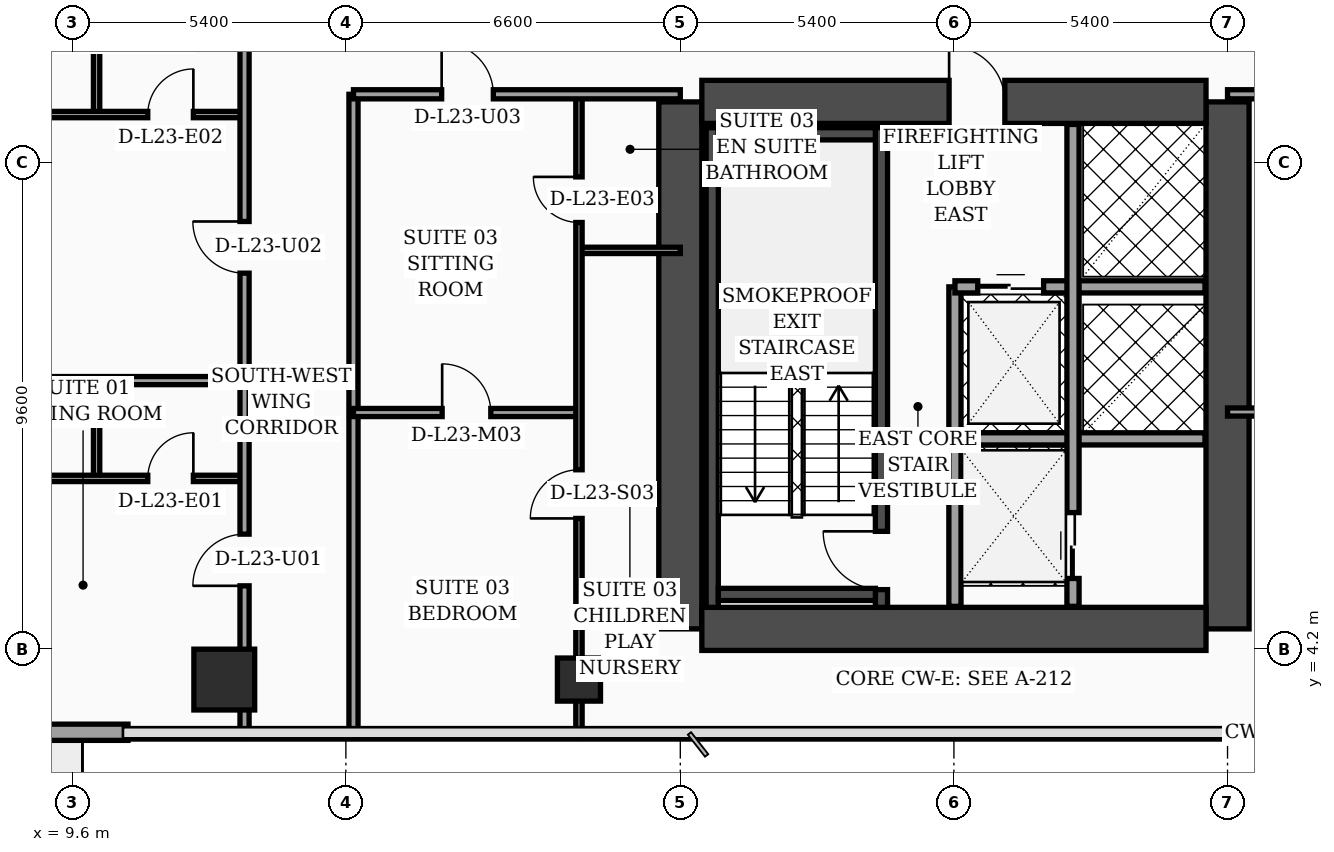
"""IFC4 building model, lengths in metres.
Left out: names, types, materials, properties, quantities, classifications, styles, units other than length and angle.
Written with IfcOpenShell. Run it as: python <this file> out.ifc"""

import sys

from ifc_helpers import new_model, si_unit, direction, frame, frame_2d, origin, origin_2d, place, context, subcontext, project, spatial, rectangle, hollow_rectangle, extrude, element, fill, save


model = new_model("IFC4")
c1 = context("Model", 3, precision=1e-05, world=origin(), true_north=direction((0.0, 1.0)))
c2 = subcontext(c1, "Body", "Model", "MODEL_VIEW")
j1 = project(units=[si_unit("LENGTHUNIT", "METRE"), si_unit("PLANEANGLEUNIT", "RADIAN")], contexts=[c1])
p1 = place(None, origin())
s1 = spatial("IfcSite", under=j1, at=p1, CompositionType="ELEMENT")
p2 = place(p1, origin())
s2 = spatial("IfcBuilding", under=s1, at=p2, CompositionType="ELEMENT")
p3 = place(p2, frame((0.0, 0.0, 97.4)))
s3 = spatial("IfcBuildingStorey", under=s2, at=p3, CompositionType="ELEMENT", Elevation=97.4)
for number, where, z_axis, x_axis in (
    (1, (21.6, 4.6, 0.0), (0.0, 0.0, 1.0), (0.0, 1.0, 0.0)),
    (2, (32.4, 4.6, 0.0), (0.0, 0.0, 1.0), (0.0, 1.0, 0.0)),
):
    element("IfcWall", number, at=place(p3, frame(where, z_axis=z_axis, x_axis=x_axis)), inside=s3, PredefinedType="SHEAR", context=c2, shape_type="SweptSolid", body=[
        extrude(rectangle(XDim=10.4, YDim=0.85, at=frame_2d((5.2, 0.0))), origin(), (0.0, 0.0, 1.0), 3.56),
    ])
p4 = place(p3, frame((22.025, 15.0, 0.0), z_axis=(0.0, 0.0, 1.0), x_axis=(1.0, 0.0, 0.0)))
e3 = element("IfcWall", 3, at=p4, inside=s3, PredefinedType="SHEAR", context=c2, shape_type="SweptSolid", body=[
    extrude(rectangle(XDim=9.95, YDim=0.85, at=frame_2d((4.975, 0.0))), origin(), (0.0, 0.0, 1.0), 3.56),
])
p5 = place(p4, frame((4.88, 0.0, 0.0)))
e4 = element("IfcOpeningElement", 4, at=p5, cuts=e3, PredefinedType="OPENING", context=c2, shape_type="SweptSolid", body=[
    extrude(rectangle(XDim=1.1, YDim=2.2, at=frame_2d((0.55, 1.1))), frame((0.0, 0.435, 0.0), z_axis=(0.0, -1.0, 0.0), x_axis=(1.0, 0.0, 0.0)), (0.0, 0.0, 1.0), 0.87),
])
p6 = place(p3, frame((22.025, 4.6, 0.0), z_axis=(0.0, 0.0, 1.0), x_axis=(1.0, 0.0, 0.0)))
e5 = element("IfcWall", 5, at=p6, inside=s3, PredefinedType="SHEAR", context=c2, shape_type="SweptSolid", body=[
    extrude(rectangle(XDim=9.95, YDim=0.85, at=frame_2d((4.975, 0.0))), origin(), (0.0, 0.0, 1.0), 3.56),
])
p7 = place(p3, frame((22.23, 5.025, 0.0), z_axis=(0.0, 0.0, 1.0), x_axis=(0.0, 1.0, 0.0)))
e6 = element("IfcWall", 6, at=p7, inside=s3, PredefinedType="SOLIDWALL", context=c2, shape_type="SweptSolid", body=[
    extrude(rectangle(XDim=9.465, YDim=0.24, at=frame_2d((4.732, 0.0))), origin(), (0.0, 0.0, 1.0), 3.56),
])
p8 = place(p3, frame((25.57, 5.025, 0.0), z_axis=(0.0, 0.0, 1.0), x_axis=(0.0, 1.0, 0.0)))
e7 = element("IfcWall", 7, at=p8, inside=s3, PredefinedType="SOLIDWALL", context=c2, shape_type="SweptSolid", body=[
    extrude(rectangle(XDim=9.465, YDim=0.24, at=frame_2d((4.732, 0.0))), origin(), (0.0, 0.0, 1.0), 3.56),
])
p9 = place(p8, frame((0.35, 0.0, 0.0)))
e8 = element("IfcOpeningElement", 8, at=p9, cuts=e7, PredefinedType="OPENING", context=c2, shape_type="SweptSolid", body=[
    extrude(rectangle(XDim=1.15, YDim=2.2, at=frame_2d((0.575, 1.1))), frame((0.0, 0.13, 0.0), z_axis=(0.0, -1.0, 0.0), x_axis=(1.0, 0.0, 0.0)), (0.0, 0.0, 1.0), 0.26),
])
for number, where, z_axis, x_axis in (
    (9, (22.35, 5.28, 0.0), (0.0, 0.0, 1.0), (1.0, 0.0, 0.0)),
    (10, (22.35, 14.37, 0.0), (0.0, 0.0, 1.0), (1.0, 0.0, 0.0)),
):
    element("IfcWall", number, at=place(p3, frame(where, z_axis=z_axis, x_axis=x_axis)), inside=s3, PredefinedType="SOLIDWALL", context=c2, shape_type="SweptSolid", body=[
        extrude(rectangle(XDim=3.1, YDim=0.24, at=frame_2d((1.55, 0.0))), origin(), (0.0, 0.0, 1.0), 3.56),
    ])
p10 = place(p3, frame((12.6, 3.6, 0.0), z_axis=(0.0, 0.0, 1.0), x_axis=(1.0, 0.0, 0.0)))
e11 = element("IfcColumn", 11, at=p10, inside=s3, PredefinedType="COLUMN", context=c2, shape_type="SweptSolid", body=[
    extrude(rectangle(XDim=1.2, YDim=1.2, at=origin_2d()), origin(), (0.0, 0.0, 1.0), 3.56),
])
p11 = place(p3, frame((19.6, 3.6, 0.0), z_axis=(0.0, 0.0, 1.0), x_axis=(1.0, 0.0, 0.0)))
e12 = element("IfcColumn", 12, at=p11, inside=s3, PredefinedType="COLUMN", context=c2, shape_type="SweptSolid", body=[
    extrude(hollow_rectangle(XDim=0.85, YDim=0.85, WallThickness=0.036, at=origin_2d()), origin(), (0.0, 0.0, 1.0), 3.56),
])
p12 = place(p3, frame((3.1, 2.56, 0.0), z_axis=(0.0, 0.0, 1.0), x_axis=(1.0, 0.0, 0.0)))
e13 = element("IfcWall", 13, at=p12, inside=s3, PredefinedType="SOLIDWALL", context=c2, shape_type="SweptSolid", body=[
    extrude(rectangle(XDim=7.6, YDim=0.32, at=frame_2d((3.8, 0.0))), origin(), (0.0, 0.0, 1.0), 3.56),
])
p13 = place(p12, frame((0.45, 0.0, 0.75)))
e14 = element("IfcOpeningElement", 14, at=p13, cuts=e13, PredefinedType="OPENING", context=c2, shape_type="SweptSolid", body=[
    extrude(rectangle(XDim=1.0, YDim=1.6, at=frame_2d((0.5, 0.8))), frame((0.0, 0.17, 0.0), z_axis=(0.0, -1.0, 0.0), x_axis=(1.0, 0.0, 0.0)), (0.0, 0.0, 1.0), 0.34),
])
p14 = place(p12, frame((3.8, 0.0, 0.0)))
e15 = element("IfcOpeningElement", 15, at=p14, cuts=e13, PredefinedType="OPENING", context=c2, shape_type="SweptSolid", body=[
    extrude(rectangle(XDim=1.4, YDim=2.25, at=frame_2d((0.7, 1.125))), frame((0.0, 0.17, 0.0), z_axis=(0.0, -1.0, 0.0), x_axis=(1.0, 0.0, 0.0)), (0.0, 0.0, 1.0), 0.34),
])
p15 = place(p3, frame((27.02, 5.045, 0.0), z_axis=(0.0, 0.0, 1.0), x_axis=(0.0, 1.0, 0.0)))
e16 = element("IfcWall", 16, at=p15, inside=s3, PredefinedType="SOLIDWALL", context=c2, shape_type="SweptSolid", body=[
    extrude(rectangle(XDim=6.305, YDim=0.24, at=frame_2d((3.153, 0.0))), origin(), (0.0, 0.0, 1.0), 3.56),
])
p16 = place(p3, frame((27.02, 11.35, 0.0), z_axis=(0.0, 0.0, 1.0), x_axis=(1.0, 0.0, 0.0)))
e17 = element("IfcWall", 17, at=p16, inside=s3, PredefinedType="SOLIDWALL", context=c2, shape_type="SweptSolid", body=[
    extrude(rectangle(XDim=4.935, YDim=0.24, at=frame_2d((2.468, 0.0))), origin(), (0.0, 0.0, 1.0), 3.56),
])
p17 = place(p16, frame((0.45, 0.0, 0.0)))
e18 = element("IfcOpeningElement", 18, at=p17, cuts=e17, PredefinedType="OPENING", context=c2, shape_type="SweptSolid", body=[
    extrude(rectangle(XDim=1.3, YDim=2.35, at=frame_2d((0.65, 1.175))), frame((0.0, 0.13, 0.0), z_axis=(0.0, -1.0, 0.0), x_axis=(1.0, 0.0, 0.0)), (0.0, 0.0, 1.0), 0.26),
])
p18 = place(p3, frame((27.02, 8.35, 0.0), z_axis=(0.0, 0.0, 1.0), x_axis=(1.0, 0.0, 0.0)))
e19 = element("IfcWall", 19, at=p18, inside=s3, PredefinedType="SOLIDWALL", context=c2, shape_type="SweptSolid", body=[
    extrude(rectangle(XDim=4.935, YDim=0.24, at=frame_2d((2.468, 0.0))), origin(), (0.0, 0.0, 1.0), 3.09),
])
p19 = place(p3, frame((29.35, 5.045, 0.0), z_axis=(0.0, 0.0, 1.0), x_axis=(0.0, 1.0, 0.0)))
e20 = element("IfcWall", 20, at=p19, inside=s3, PredefinedType="SOLIDWALL", context=c2, shape_type="SweptSolid", body=[
    extrude(rectangle(XDim=9.51, YDim=0.24, at=frame_2d((4.755, 0.0))), origin(), (0.0, 0.0, 1.0), 3.56),
])
p20 = place(p19, frame((0.55, 0.0, 0.0)))
e21 = element("IfcOpeningElement", 21, at=p20, cuts=e20, PredefinedType="OPENING", context=c2, shape_type="SweptSolid", body=[
    extrude(rectangle(XDim=1.3, YDim=2.35, at=frame_2d((0.65, 1.175))), frame((0.0, 0.13, 0.0), z_axis=(0.0, -1.0, 0.0), x_axis=(1.0, 0.0, 0.0)), (0.0, 0.0, 1.0), 0.26),
])
p21 = place(p3, frame((10.08, 7.57, 0.0), z_axis=(0.0, 0.0, 1.0), x_axis=(0.0, 1.0, 0.0)))
e22 = element("IfcWall", 22, at=p21, inside=s3, PredefinedType="PARTITIONING", context=c2, shape_type="SweptSolid", body=[
    extrude(rectangle(XDim=1.93, YDim=0.125, at=frame_2d((0.965, 0.0))), origin(), (0.0, 0.0, 1.0), 3.09),
])
p22 = place(p3, frame((3.2, 7.57, 0.0), z_axis=(0.0, 0.0, 1.0), x_axis=(1.0, 0.0, 0.0)))
e23 = element("IfcWall", 23, at=p22, inside=s3, PredefinedType="PARTITIONING", context=c2, shape_type="SweptSolid", body=[
    extrude(rectangle(XDim=9.8, YDim=0.125, at=frame_2d((4.9, 0.0))), origin(), (0.0, 0.0, 1.0), 2.84),
])
p23 = place(p22, frame((3.32, 0.0, 0.0)))
e24 = element("IfcOpeningElement", 24, at=p23, cuts=e23, PredefinedType="OPENING", context=c2, shape_type="SweptSolid", body=[
    extrude(rectangle(XDim=0.96, YDim=2.2, at=frame_2d((0.48, 1.1))), frame((0.0, 0.073, 0.0), z_axis=(0.0, -1.0, 0.0), x_axis=(1.0, 0.0, 0.0)), (0.0, 0.0, 1.0), 0.145),
])
p24 = place(p22, frame((7.89, 0.0, 0.0)))
e25 = element("IfcOpeningElement", 25, at=p24, cuts=e23, PredefinedType="OPENING", context=c2, shape_type="SweptSolid", body=[
    extrude(rectangle(XDim=0.9, YDim=2.15, at=frame_2d((0.45, 1.075))), frame((0.0, 0.073, 0.0), z_axis=(0.0, -1.0, 0.0), x_axis=(1.0, 0.0, 0.0)), (0.0, 0.0, 1.0), 0.145),
])
p25 = place(p3, frame((10.08, 14.75, 0.0), z_axis=(0.0, 0.0, 1.0), x_axis=(0.0, 1.0, 0.0)))
e26 = element("IfcWall", 26, at=p25, inside=s3, PredefinedType="PARTITIONING", context=c2, shape_type="SweptSolid", body=[
    extrude(rectangle(XDim=2.05, YDim=0.125, at=frame_2d((1.025, 0.0))), origin(), (0.0, 0.0, 1.0), 3.56),
])
p26 = place(p3, frame((0.08, 14.75, 0.0), z_axis=(0.0, 0.0, 1.0), x_axis=(1.0, 0.0, 0.0)))
e27 = element("IfcWall", 27, at=p26, inside=s3, PredefinedType="PARTITIONING", context=c2, shape_type="SweptSolid", body=[
    extrude(rectangle(XDim=12.92, YDim=0.125, at=frame_2d((6.46, 0.0))), origin(), (0.0, 0.0, 1.0), 2.84),
])
p27 = place(p26, frame((4.52, 0.0, 0.0)))
e28 = element("IfcOpeningElement", 28, at=p27, cuts=e27, PredefinedType="OPENING", context=c2, shape_type="SweptSolid", body=[
    extrude(rectangle(XDim=0.96, YDim=2.2, at=frame_2d((0.48, 1.1))), frame((0.0, 0.073, 0.0), z_axis=(0.0, -1.0, 0.0), x_axis=(1.0, 0.0, 0.0)), (0.0, 0.0, 1.0), 0.145),
])
p28 = place(p26, frame((11.01, 0.0, 0.0)))
e29 = element("IfcOpeningElement", 29, at=p28, cuts=e27, PredefinedType="OPENING", context=c2, shape_type="SweptSolid", body=[
    extrude(rectangle(XDim=0.9, YDim=2.15, at=frame_2d((0.45, 1.075))), frame((0.0, 0.073, 0.0), z_axis=(0.0, -1.0, 0.0), x_axis=(1.0, 0.0, 0.0)), (0.0, 0.0, 1.0), 0.145),
])
p29 = place(p3, frame((0.08, 9.5, 0.0), z_axis=(0.0, 0.0, 1.0), x_axis=(1.0, 0.0, 0.0)))
e30 = element("IfcWall", 30, at=p29, inside=s3, PredefinedType="PARTITIONING", context=c2, shape_type="SweptSolid", body=[
    extrude(rectangle(XDim=12.92, YDim=0.16, at=frame_2d((6.46, 0.0))), origin(), (0.0, 0.0, 1.0), 2.84),
])
p30 = place(p3, frame((13.0, 2.44, 0.0), z_axis=(0.0, 0.0, 1.0), x_axis=(0.0, 1.0, 0.0)))
e31 = element("IfcWall", 31, at=p30, inside=s3, PredefinedType="PARTITIONING", context=c2, shape_type="SweptSolid", body=[
    extrude(rectangle(XDim=14.36, YDim=0.18, at=frame_2d((7.18, 0.0))), origin(), (0.0, 0.0, 1.0), 2.84),
])
p31 = place(p30, frame((3.01, 0.0, 0.0)))
e32 = element("IfcOpeningElement", 32, at=p31, cuts=e31, PredefinedType="OPENING", context=c2, shape_type="SweptSolid", body=[
    extrude(rectangle(XDim=1.02, YDim=2.2, at=frame_2d((0.51, 1.1))), frame((0.0, 0.1, 0.0), z_axis=(0.0, -1.0, 0.0), x_axis=(1.0, 0.0, 0.0)), (0.0, 0.0, 1.0), 0.2),
])
p32 = place(p30, frame((9.18, 0.0, 0.0)))
e33 = element("IfcOpeningElement", 33, at=p32, cuts=e31, PredefinedType="OPENING", context=c2, shape_type="SweptSolid", body=[
    extrude(rectangle(XDim=1.02, YDim=2.2, at=frame_2d((0.51, 1.1))), frame((0.0, 0.1, 0.0), z_axis=(0.0, -1.0, 0.0), x_axis=(1.0, 0.0, 0.0)), (0.0, 0.0, 1.0), 0.2),
])
p33 = place(p3, frame((15.15, 2.44, 0.0), z_axis=(0.0, 0.0, 1.0), x_axis=(0.0, 1.0, 0.0)))
e34 = element("IfcWall", 34, at=p33, inside=s3, PredefinedType="PARTITIONING", context=c2, shape_type="SweptSolid", body=[
    extrude(rectangle(XDim=12.71, YDim=0.18, at=frame_2d((6.355, 0.0))), origin(), (0.0, 0.0, 1.0), 3.04),
])
p34 = place(p3, frame((19.6, 12.07, 0.0), z_axis=(0.0, 0.0, 1.0), x_axis=(1.0, 0.0, 0.0)))
e35 = element("IfcWall", 35, at=p34, inside=s3, PredefinedType="PARTITIONING", context=c2, shape_type="SweptSolid", body=[
    extrude(rectangle(XDim=2.0, YDim=0.125, at=frame_2d((1.0, 0.0))), origin(), (0.0, 0.0, 1.0), 3.56),
])
p35 = place(p3, frame((15.15, 8.87, 0.0), z_axis=(0.0, 0.0, 1.0), x_axis=(1.0, 0.0, 0.0)))
e36 = element("IfcWall", 36, at=p35, inside=s3, PredefinedType="PARTITIONING", context=c2, shape_type="SweptSolid", body=[
    extrude(rectangle(XDim=4.45, YDim=0.16, at=frame_2d((2.225, 0.0))), origin(), (0.0, 0.0, 1.0), 3.56),
])
p36 = place(p35, frame((1.75, 0.0, 0.0)))
e37 = element("IfcOpeningElement", 37, at=p36, cuts=e36, PredefinedType="OPENING", context=c2, shape_type="SweptSolid", body=[
    extrude(rectangle(XDim=0.96, YDim=2.2, at=frame_2d((0.48, 1.1))), frame((0.0, 0.09, 0.0), z_axis=(0.0, -1.0, 0.0), x_axis=(1.0, 0.0, 0.0)), (0.0, 0.0, 1.0), 0.18),
])
p37 = place(p3, frame((19.6, 2.44, 0.0), z_axis=(0.0, 0.0, 1.0), x_axis=(0.0, 1.0, 0.0)))
e38 = element("IfcWall", 38, at=p37, inside=s3, PredefinedType="PARTITIONING", context=c2, shape_type="SweptSolid", body=[
    extrude(rectangle(XDim=12.71, YDim=0.125, at=frame_2d((6.355, 0.0))), origin(), (0.0, 0.0, 1.0), 2.49),
])
p38 = place(p37, frame((4.34, 0.0, 0.0)))
e39 = element("IfcOpeningElement", 39, at=p38, cuts=e38, PredefinedType="OPENING", context=c2, shape_type="SweptSolid", body=[
    extrude(rectangle(XDim=0.96, YDim=2.2, at=frame_2d((0.48, 1.1))), frame((0.0, 0.073, 0.0), z_axis=(0.0, -1.0, 0.0), x_axis=(1.0, 0.0, 0.0)), (0.0, 0.0, 1.0), 0.145),
])
p39 = place(p37, frame((10.18, 0.0, 0.0)))
e40 = element("IfcOpeningElement", 40, at=p39, cuts=e38, PredefinedType="OPENING", context=c2, shape_type="SweptSolid", body=[
    extrude(rectangle(XDim=0.9, YDim=2.15, at=frame_2d((0.45, 1.075))), frame((0.0, 0.073, 0.0), z_axis=(0.0, -1.0, 0.0), x_axis=(1.0, 0.0, 0.0)), (0.0, 0.0, 1.0), 0.145),
])
p40 = place(p3, frame((15.15, 15.15, 0.0), z_axis=(0.0, 0.0, 1.0), x_axis=(1.0, 0.0, 0.0)))
e41 = element("IfcWall", 41, at=p40, inside=s3, PredefinedType="PARTITIONING", context=c2, shape_type="SweptSolid", body=[
    extrude(rectangle(XDim=6.45, YDim=0.18, at=frame_2d((3.225, 0.0))), origin(), (0.0, 0.0, 1.0), 2.49),
])
p41 = place(p40, frame((1.74, 0.0, 0.0)))
e42 = element("IfcOpeningElement", 42, at=p41, cuts=e41, PredefinedType="OPENING", context=c2, shape_type="SweptSolid", body=[
    extrude(rectangle(XDim=1.02, YDim=2.2, at=frame_2d((0.51, 1.1))), frame((0.0, 0.1, 0.0), z_axis=(0.0, -1.0, 0.0), x_axis=(1.0, 0.0, 0.0)), (0.0, 0.0, 1.0), 0.2),
])
p42 = place(p3, frame((32.4, 8.88, 0.0), z_axis=(0.0, 0.0, 1.0), x_axis=(1.0, 0.0, 0.0)))
e43 = element("IfcWall", 43, at=p42, inside=s3, PredefinedType="PARTITIONING", context=c2, shape_type="SweptSolid", body=[
    extrude(rectangle(XDim=8.77, YDim=0.16, at=frame_2d((4.385, 0.0))), origin(), (0.0, 0.0, 1.0), 2.84),
])
p43 = place(p42, frame((3.91, 0.0, 0.0)))
e44 = element("IfcOpeningElement", 44, at=p43, cuts=e43, PredefinedType="OPENING", context=c2, shape_type="SweptSolid", body=[
    extrude(rectangle(XDim=0.96, YDim=2.2, at=frame_2d((0.48, 1.1))), frame((0.0, 0.09, 0.0), z_axis=(0.0, -1.0, 0.0), x_axis=(1.0, 0.0, 0.0)), (0.0, 0.0, 1.0), 0.18),
])
p44 = place(p3, frame((32.4, 15.15, 0.0), z_axis=(0.0, 0.0, 1.0), x_axis=(1.0, 0.0, 0.0)))
e45 = element("IfcWall", 45, at=p44, inside=s3, PredefinedType="PARTITIONING", context=c2, shape_type="SweptSolid", body=[
    extrude(rectangle(XDim=20.2, YDim=0.18, at=frame_2d((10.1, 0.0))), origin(), (0.0, 0.0, 1.0), 2.84),
])
p45 = place(p44, frame((3.98, 0.0, 0.0)))
e46 = element("IfcOpeningElement", 46, at=p45, cuts=e45, PredefinedType="OPENING", context=c2, shape_type="SweptSolid", body=[
    extrude(rectangle(XDim=1.02, YDim=2.2, at=frame_2d((0.51, 1.1))), frame((0.0, 0.1, 0.0), z_axis=(0.0, -1.0, 0.0), x_axis=(1.0, 0.0, 0.0)), (0.0, 0.0, 1.0), 0.2),
])
p46 = place(p44, frame((13.98, 0.0, 0.0)))
e47 = element("IfcOpeningElement", 47, at=p46, cuts=e45, PredefinedType="OPENING", context=c2, shape_type="SweptSolid", body=[
    extrude(rectangle(XDim=1.02, YDim=2.2, at=frame_2d((0.51, 1.1))), frame((0.0, 0.1, 0.0), z_axis=(0.0, -1.0, 0.0), x_axis=(1.0, 0.0, 0.0)), (0.0, 0.0, 1.0), 0.2),
])
p47 = place(p17, origin())
e48 = element("IfcDoor", 48, at=p47, inside=s3, OperationType="DOUBLE_DOOR_SLIDING", PredefinedType="DOOR", context=c2, shape_type="SweptSolid", body=[
    extrude(rectangle(XDim=1.3, YDim=2.35, at=frame_2d((0.65, 1.175))), frame((0.0, 0.025, 0.0), z_axis=(0.0, -1.0, 0.0), x_axis=(1.0, 0.0, 0.0)), (0.0, 0.0, 1.0), 0.05),
])
fill(e18, e48)
p48 = place(p20, origin())
e49 = element("IfcDoor", 49, at=p48, inside=s3, OperationType="DOUBLE_DOOR_SLIDING", PredefinedType="DOOR", context=c2, shape_type="SweptSolid", body=[
    extrude(rectangle(XDim=1.3, YDim=2.35, at=frame_2d((0.65, 1.175))), frame((0.0, 0.025, 0.0), z_axis=(0.0, -1.0, 0.0), x_axis=(1.0, 0.0, 0.0)), (0.0, 0.0, 1.0), 0.05),
])
fill(e21, e49)
p49 = place(p24, origin())
e50 = element("IfcDoor", 50, at=p49, inside=s3, OperationType="SINGLE_SWING_RIGHT", PredefinedType="DOOR", context=c2, shape_type="SweptSolid", body=[
    extrude(rectangle(XDim=0.9, YDim=2.15, at=frame_2d((0.45, 1.075))), frame((0.0, 0.025, 0.0), z_axis=(0.0, -1.0, 0.0), x_axis=(1.0, 0.0, 0.0)), (0.0, 0.0, 1.0), 0.05),
])
fill(e25, e50)
p50 = place(p28, origin())
e51 = element("IfcDoor", 51, at=p50, inside=s3, OperationType="SINGLE_SWING_RIGHT", PredefinedType="DOOR", context=c2, shape_type="SweptSolid", body=[
    extrude(rectangle(XDim=0.9, YDim=2.15, at=frame_2d((0.45, 1.075))), frame((0.0, 0.025, 0.0), z_axis=(0.0, -1.0, 0.0), x_axis=(1.0, 0.0, 0.0)), (0.0, 0.0, 1.0), 0.05),
])
fill(e29, e51)
p51 = place(p31, origin())
e52 = element("IfcDoor", 52, at=p51, inside=s3, OperationType="SINGLE_SWING_LEFT", PredefinedType="DOOR", context=c2, shape_type="SweptSolid", body=[
    extrude(rectangle(XDim=1.02, YDim=2.2, at=frame_2d((0.51, 1.1))), frame((0.0, 0.025, 0.0), z_axis=(0.0, -1.0, 0.0), x_axis=(1.0, 0.0, 0.0)), (0.0, 0.0, 1.0), 0.05),
])
fill(e32, e52)
p52 = place(p32, origin())
e53 = element("IfcDoor", 53, at=p52, inside=s3, OperationType="SINGLE_SWING_RIGHT", PredefinedType="DOOR", context=c2, shape_type="SweptSolid", body=[
    extrude(rectangle(XDim=1.02, YDim=2.2, at=frame_2d((0.51, 1.1))), frame((0.0, 0.025, 0.0), z_axis=(0.0, -1.0, 0.0), x_axis=(1.0, 0.0, 0.0)), (0.0, 0.0, 1.0), 0.05),
])
fill(e33, e53)
p53 = place(p36, origin())
e54 = element("IfcDoor", 54, at=p53, inside=s3, OperationType="SINGLE_SWING_LEFT", PredefinedType="DOOR", context=c2, shape_type="SweptSolid", body=[
    extrude(rectangle(XDim=0.96, YDim=2.2, at=frame_2d((0.48, 1.1))), frame((0.0, 0.025, 0.0), z_axis=(0.0, -1.0, 0.0), x_axis=(1.0, 0.0, 0.0)), (0.0, 0.0, 1.0), 0.05),
])
fill(e37, e54)
p54 = place(p38, origin())
e55 = element("IfcDoor", 55, at=p54, inside=s3, OperationType="SINGLE_SWING_LEFT", PredefinedType="DOOR", context=c2, shape_type="SweptSolid", body=[
    extrude(rectangle(XDim=0.96, YDim=2.2, at=frame_2d((0.48, 1.1))), frame((0.0, 0.025, 0.0), z_axis=(0.0, -1.0, 0.0), x_axis=(1.0, 0.0, 0.0)), (0.0, 0.0, 1.0), 0.05),
])
fill(e39, e55)
p55 = place(p39, origin())
e56 = element("IfcDoor", 56, at=p55, inside=s3, OperationType="SINGLE_SWING_RIGHT", PredefinedType="DOOR", context=c2, shape_type="SweptSolid", body=[
    extrude(rectangle(XDim=0.9, YDim=2.15, at=frame_2d((0.45, 1.075))), frame((0.0, 0.025, 0.0), z_axis=(0.0, -1.0, 0.0), x_axis=(1.0, 0.0, 0.0)), (0.0, 0.0, 1.0), 0.05),
])
fill(e40, e56)
p56 = place(p41, origin())
e57 = element("IfcDoor", 57, at=p56, inside=s3, OperationType="SINGLE_SWING_LEFT", PredefinedType="DOOR", context=c2, shape_type="SweptSolid", body=[
    extrude(rectangle(XDim=1.02, YDim=2.2, at=frame_2d((0.51, 1.1))), frame((0.0, 0.025, 0.0), z_axis=(0.0, -1.0, 0.0), x_axis=(1.0, 0.0, 0.0)), (0.0, 0.0, 1.0), 0.05),
])
fill(e42, e57)
p57 = place(p9, origin())
e58 = element("IfcDoor", 58, at=p57, inside=s3, OperationType="SINGLE_SWING_RIGHT", PredefinedType="DOOR", context=c2, shape_type="SweptSolid", body=[
    extrude(rectangle(XDim=1.15, YDim=2.2, at=frame_2d((0.575, 1.1))), frame((0.0, 0.025, 0.0), z_axis=(0.0, -1.0, 0.0), x_axis=(1.0, 0.0, 0.0)), (0.0, 0.0, 1.0), 0.05),
])
fill(e8, e58)
p58 = place(p5, origin())
e59 = element("IfcDoor", 59, at=p58, inside=s3, OperationType="SINGLE_SWING_LEFT", PredefinedType="DOOR", context=c2, shape_type="SweptSolid", body=[
    extrude(rectangle(XDim=1.1, YDim=2.2, at=frame_2d((0.55, 1.1))), frame((0.0, 0.025, 0.0), z_axis=(0.0, -1.0, 0.0), x_axis=(1.0, 0.0, 0.0)), (0.0, 0.0, 1.0), 0.05),
])
fill(e4, e59)
save(model, sys.argv[1])
